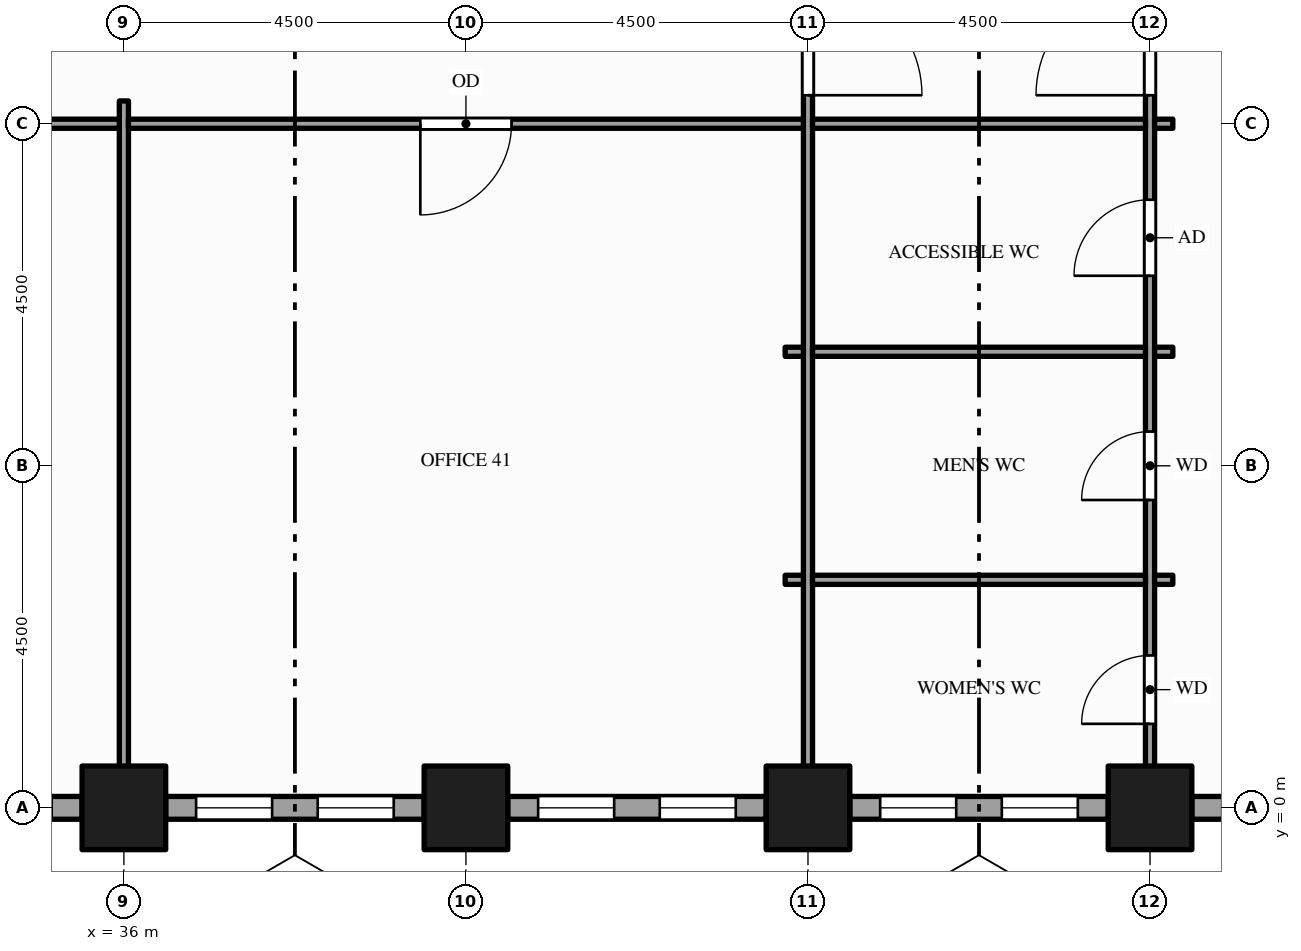
"""IFC4 building model, lengths in metres.
Left out: names, types, materials, properties, quantities, classifications, styles, units other than length and angle.
Written with IfcOpenShell. Run it as: python <this file> out.ifc"""

import sys

from ifc_helpers import new_model, si_unit, direction, frame, frame_2d, origin, origin_2d, place, context, subcontext, project, spatial, rectangle, hollow_rectangle, extrude, element, fill, save


model = new_model("IFC4")
c1 = context("Model", 3, precision=1e-05, world=origin(), true_north=direction((0.0, 1.0)))
c2 = subcontext(c1, "Body", "Model", "MODEL_VIEW")
j1 = project(units=[si_unit("LENGTHUNIT", "METRE"), si_unit("PLANEANGLEUNIT", "RADIAN")], contexts=[c1])
p1 = place(None, origin())
s1 = spatial("IfcSite", under=j1, at=p1, CompositionType="ELEMENT")
p2 = place(p1, origin())
s2 = spatial("IfcBuilding", under=s1, at=p2, CompositionType="ELEMENT")
p3 = place(p2, frame((0.0, 0.0, 14.0)))
s3 = spatial("IfcBuildingStorey", under=s2, at=p3, CompositionType="ELEMENT", Elevation=14.0)
for number, where, z_axis, x_axis in (
    (1, (36.0, 0.0, -0.25), (0.0, 0.0, 1.0), (1.0, 0.0, 0.0)),
    (2, (40.5, 0.0, -0.25), (0.0, 0.0, 1.0), (1.0, 0.0, 0.0)),
    (3, (45.0, 0.0, -0.25), (0.0, 0.0, 1.0), (1.0, 0.0, 0.0)),
    (4, (49.5, 0.0, -0.25), (0.0, 0.0, 1.0), (1.0, 0.0, 0.0)),
):
    element("IfcColumn", number, at=place(p3, frame(where, z_axis=z_axis, x_axis=x_axis)), inside=s3, PredefinedType="COLUMN", context=c2, shape_type="SweptSolid", body=[
        extrude(hollow_rectangle(XDim=1.1, YDim=1.1, WallThickness=0.06, at=origin_2d()), origin(), (0.0, 0.0, 1.0), 5.0),
    ])
p4 = place(p3, frame((32.05, 0.0, 0.0), z_axis=(0.0, 0.0, 1.0), x_axis=(1.0, 0.0, 0.0)))
e5 = element("IfcWall", 5, at=p4, inside=s3, PredefinedType="STANDARD", context=c2, shape_type="SweptSolid", body=[
    extrude(rectangle(XDim=3.4, YDim=0.3, at=frame_2d((1.7, 0.0))), origin(), (0.0, 0.0, 1.0), 4.036),
])
p5 = place(p4, frame((0.4, 0.0, 0.9)))
e6 = element("IfcOpeningElement", 6, at=p5, cuts=e5, PredefinedType="OPENING", context=c2, shape_type="SweptSolid", body=[
    extrude(rectangle(XDim=1.0, YDim=2.75, at=frame_2d((0.5, 1.375))), frame((0.0, 0.16, 0.0), z_axis=(0.0, -1.0, 0.0), x_axis=(1.0, 0.0, 0.0)), (0.0, 0.0, 1.0), 0.32),
])
p6 = place(p4, frame((2.0, 0.0, 0.9)))
e7 = element("IfcOpeningElement", 7, at=p6, cuts=e5, PredefinedType="OPENING", context=c2, shape_type="SweptSolid", body=[
    extrude(rectangle(XDim=1.0, YDim=2.75, at=frame_2d((0.5, 1.375))), frame((0.0, 0.16, 0.0), z_axis=(0.0, -1.0, 0.0), x_axis=(1.0, 0.0, 0.0)), (0.0, 0.0, 1.0), 0.32),
])
p7 = place(p3, frame((36.55, 0.0, 0.0), z_axis=(0.0, 0.0, 1.0), x_axis=(1.0, 0.0, 0.0)))
e8 = element("IfcWall", 8, at=p7, inside=s3, PredefinedType="STANDARD", context=c2, shape_type="SweptSolid", body=[
    extrude(rectangle(XDim=3.4, YDim=0.3, at=frame_2d((1.7, 0.0))), origin(), (0.0, 0.0, 1.0), 4.036),
])
p8 = place(p7, frame((0.4, 0.0, 0.9)))
e9 = element("IfcOpeningElement", 9, at=p8, cuts=e8, PredefinedType="OPENING", context=c2, shape_type="SweptSolid", body=[
    extrude(rectangle(XDim=1.0, YDim=2.75, at=frame_2d((0.5, 1.375))), frame((0.0, 0.16, 0.0), z_axis=(0.0, -1.0, 0.0), x_axis=(1.0, 0.0, 0.0)), (0.0, 0.0, 1.0), 0.32),
])
p9 = place(p7, frame((2.0, 0.0, 0.9)))
e10 = element("IfcOpeningElement", 10, at=p9, cuts=e8, PredefinedType="OPENING", context=c2, shape_type="SweptSolid", body=[
    extrude(rectangle(XDim=1.0, YDim=2.75, at=frame_2d((0.5, 1.375))), frame((0.0, 0.16, 0.0), z_axis=(0.0, -1.0, 0.0), x_axis=(1.0, 0.0, 0.0)), (0.0, 0.0, 1.0), 0.32),
])
p10 = place(p3, frame((41.05, 0.0, 0.0), z_axis=(0.0, 0.0, 1.0), x_axis=(1.0, 0.0, 0.0)))
e11 = element("IfcWall", 11, at=p10, inside=s3, PredefinedType="STANDARD", context=c2, shape_type="SweptSolid", body=[
    extrude(rectangle(XDim=3.4, YDim=0.3, at=frame_2d((1.7, 0.0))), origin(), (0.0, 0.0, 1.0), 4.036),
])
p11 = place(p10, frame((0.4, 0.0, 0.9)))
e12 = element("IfcOpeningElement", 12, at=p11, cuts=e11, PredefinedType="OPENING", context=c2, shape_type="SweptSolid", body=[
    extrude(rectangle(XDim=1.0, YDim=2.75, at=frame_2d((0.5, 1.375))), frame((0.0, 0.16, 0.0), z_axis=(0.0, -1.0, 0.0), x_axis=(1.0, 0.0, 0.0)), (0.0, 0.0, 1.0), 0.32),
])
p12 = place(p10, frame((2.0, 0.0, 0.9)))
e13 = element("IfcOpeningElement", 13, at=p12, cuts=e11, PredefinedType="OPENING", context=c2, shape_type="SweptSolid", body=[
    extrude(rectangle(XDim=1.0, YDim=2.75, at=frame_2d((0.5, 1.375))), frame((0.0, 0.16, 0.0), z_axis=(0.0, -1.0, 0.0), x_axis=(1.0, 0.0, 0.0)), (0.0, 0.0, 1.0), 0.32),
])
p13 = place(p3, frame((45.55, 0.0, 0.0), z_axis=(0.0, 0.0, 1.0), x_axis=(1.0, 0.0, 0.0)))
e14 = element("IfcWall", 14, at=p13, inside=s3, PredefinedType="STANDARD", context=c2, shape_type="SweptSolid", body=[
    extrude(rectangle(XDim=3.4, YDim=0.3, at=frame_2d((1.7, 0.0))), origin(), (0.0, 0.0, 1.0), 4.036),
])
p14 = place(p13, frame((0.4, 0.0, 0.9)))
e15 = element("IfcOpeningElement", 15, at=p14, cuts=e14, PredefinedType="OPENING", context=c2, shape_type="SweptSolid", body=[
    extrude(rectangle(XDim=1.0, YDim=2.75, at=frame_2d((0.5, 1.375))), frame((0.0, 0.16, 0.0), z_axis=(0.0, -1.0, 0.0), x_axis=(1.0, 0.0, 0.0)), (0.0, 0.0, 1.0), 0.32),
])
p15 = place(p13, frame((2.0, 0.0, 0.9)))
e16 = element("IfcOpeningElement", 16, at=p15, cuts=e14, PredefinedType="OPENING", context=c2, shape_type="SweptSolid", body=[
    extrude(rectangle(XDim=1.0, YDim=2.75, at=frame_2d((0.5, 1.375))), frame((0.0, 0.16, 0.0), z_axis=(0.0, -1.0, 0.0), x_axis=(1.0, 0.0, 0.0)), (0.0, 0.0, 1.0), 0.32),
])
p16 = place(p3, frame((50.05, 0.0, 0.0), z_axis=(0.0, 0.0, 1.0), x_axis=(1.0, 0.0, 0.0)))
e17 = element("IfcWall", 17, at=p16, inside=s3, PredefinedType="STANDARD", context=c2, shape_type="SweptSolid", body=[
    extrude(rectangle(XDim=3.949, YDim=0.3, at=frame_2d((1.975, 0.0))), origin(), (0.0, 0.0, 1.0), 4.036),
])
p17 = place(p16, frame((0.4, 0.0, 0.9)))
e18 = element("IfcOpeningElement", 18, at=p17, cuts=e17, PredefinedType="OPENING", context=c2, shape_type="SweptSolid", body=[
    extrude(rectangle(XDim=1.0, YDim=2.75, at=frame_2d((0.5, 1.375))), frame((0.0, 0.16, 0.0), z_axis=(0.0, -1.0, 0.0), x_axis=(1.0, 0.0, 0.0)), (0.0, 0.0, 1.0), 0.32),
])
p18 = place(p16, frame((2.024, 0.0, 0.9)))
e19 = element("IfcOpeningElement", 19, at=p18, cuts=e17, PredefinedType="OPENING", context=c2, shape_type="SweptSolid", body=[
    extrude(rectangle(XDim=1.5, YDim=2.75, at=frame_2d((0.75, 1.375))), frame((0.0, 0.16, 0.0), z_axis=(0.0, -1.0, 0.0), x_axis=(1.0, 0.0, 0.0)), (0.0, 0.0, 1.0), 0.32),
])
p19 = place(p3, frame((36.0, 0.15, 0.0), z_axis=(0.0, 0.0, 1.0), x_axis=(0.0, 1.0, 0.0)))
e20 = element("IfcWall", 20, at=p19, inside=s3, PredefinedType="PARTITIONING", context=c2, shape_type="SweptSolid", body=[
    extrude(rectangle(XDim=9.15, YDim=0.12, at=frame_2d((4.575, 0.0))), origin(), (0.0, 0.0, 1.0), 3.759),
])
p20 = place(p3, frame((45.0, 0.15, 0.0), z_axis=(0.0, 0.0, 1.0), x_axis=(0.0, 1.0, 0.0)))
e21 = element("IfcWall", 21, at=p20, inside=s3, PredefinedType="PARTITIONING", context=c2, shape_type="SweptSolid", body=[
    extrude(rectangle(XDim=22.65, YDim=0.12, at=frame_2d((11.325, 0.0))), origin(), (0.0, 0.0, 1.0), 3.759),
])
p21 = place(p20, frame((9.225, 0.0, 0.0)))
e22 = element("IfcOpeningElement", 22, at=p21, cuts=e21, PredefinedType="OPENING", context=c2, shape_type="SweptSolid", body=[
    extrude(rectangle(XDim=1.5, YDim=2.1, at=frame_2d((0.75, 1.05))), frame((0.0, 0.07, 0.0), z_axis=(0.0, -1.0, 0.0), x_axis=(1.0, 0.0, 0.0)), (0.0, 0.0, 1.0), 0.14),
])
p22 = place(p3, frame((49.5, 0.15, 0.0), z_axis=(0.0, 0.0, 1.0), x_axis=(0.0, 1.0, 0.0)))
e23 = element("IfcWall", 23, at=p22, inside=s3, PredefinedType="PARTITIONING", context=c2, shape_type="SweptSolid", body=[
    extrude(rectangle(XDim=22.65, YDim=0.12, at=frame_2d((11.325, 0.0))), origin(), (0.0, 0.0, 1.0), 3.759),
])
p23 = place(p22, frame((0.955, 0.0, 0.0)))
e24 = element("IfcOpeningElement", 24, at=p23, cuts=e23, PredefinedType="OPENING", context=c2, shape_type="SweptSolid", body=[
    extrude(rectangle(XDim=0.9, YDim=2.1, at=frame_2d((0.45, 1.05))), frame((0.0, 0.07, 0.0), z_axis=(0.0, -1.0, 0.0), x_axis=(1.0, 0.0, 0.0)), (0.0, 0.0, 1.0), 0.14),
])
p24 = place(p22, frame((3.9, 0.0, 0.0)))
e25 = element("IfcOpeningElement", 25, at=p24, cuts=e23, PredefinedType="OPENING", context=c2, shape_type="SweptSolid", body=[
    extrude(rectangle(XDim=0.9, YDim=2.1, at=frame_2d((0.45, 1.05))), frame((0.0, 0.07, 0.0), z_axis=(0.0, -1.0, 0.0), x_axis=(1.0, 0.0, 0.0)), (0.0, 0.0, 1.0), 0.14),
])
p25 = place(p22, frame((6.85, 0.0, 0.0)))
e26 = element("IfcOpeningElement", 26, at=p25, cuts=e23, PredefinedType="OPENING", context=c2, shape_type="SweptSolid", body=[
    extrude(rectangle(XDim=1.0, YDim=2.1, at=frame_2d((0.5, 1.05))), frame((0.0, 0.07, 0.0), z_axis=(0.0, -1.0, 0.0), x_axis=(1.0, 0.0, 0.0)), (0.0, 0.0, 1.0), 0.14),
])
p26 = place(p22, frame((16.275, 0.0, 0.0)))
e27 = element("IfcOpeningElement", 27, at=p26, cuts=e23, PredefinedType="OPENING", context=c2, shape_type="SweptSolid", body=[
    extrude(rectangle(XDim=0.9, YDim=2.1, at=frame_2d((0.45, 1.05))), frame((0.0, 0.07, 0.0), z_axis=(0.0, -1.0, 0.0), x_axis=(1.0, 0.0, 0.0)), (0.0, 0.0, 1.0), 0.14),
])
p27 = place(p22, frame((9.225, 0.0, 0.0)))
e28 = element("IfcOpeningElement", 28, at=p27, cuts=e23, PredefinedType="OPENING", context=c2, shape_type="SweptSolid", body=[
    extrude(rectangle(XDim=1.5, YDim=2.1, at=frame_2d((0.75, 1.05))), frame((0.0, 0.07, 0.0), z_axis=(0.0, -1.0, 0.0), x_axis=(1.0, 0.0, 0.0)), (0.0, 0.0, 1.0), 0.14),
])
p28 = place(p3, frame((44.7, 3.0, 0.0), z_axis=(0.0, 0.0, 1.0), x_axis=(1.0, 0.0, 0.0)))
e29 = element("IfcWall", 29, at=p28, inside=s3, PredefinedType="PARTITIONING", context=c2, shape_type="SweptSolid", body=[
    extrude(rectangle(XDim=0.24, YDim=0.12, at=frame_2d((0.12, 0.0))), origin(), (0.0, 0.0, 1.0), 3.759),
])
p29 = place(p3, frame((45.06, 3.0, 0.0), z_axis=(0.0, 0.0, 1.0), x_axis=(1.0, 0.0, 0.0)))
e30 = element("IfcWall", 30, at=p29, inside=s3, PredefinedType="PARTITIONING", context=c2, shape_type="SweptSolid", body=[
    extrude(rectangle(XDim=4.38, YDim=0.12, at=frame_2d((2.19, 0.0))), origin(), (0.0, 0.0, 1.0), 3.66),
])
for number, where, z_axis, x_axis in (
    (31, (49.56, 3.0, 0.0), (0.0, 0.0, 1.0), (1.0, 0.0, 0.0)),
    (32, (44.7, 6.0, 0.0), (0.0, 0.0, 1.0), (1.0, 0.0, 0.0)),
):
    element("IfcWall", number, at=place(p3, frame(where, z_axis=z_axis, x_axis=x_axis)), inside=s3, PredefinedType="PARTITIONING", context=c2, shape_type="SweptSolid", body=[
        extrude(rectangle(XDim=0.24, YDim=0.12, at=frame_2d((0.12, 0.0))), origin(), (0.0, 0.0, 1.0), 3.759),
    ])
p30 = place(p3, frame((45.06, 6.0, 0.0), z_axis=(0.0, 0.0, 1.0), x_axis=(1.0, 0.0, 0.0)))
e33 = element("IfcWall", 33, at=p30, inside=s3, PredefinedType="PARTITIONING", context=c2, shape_type="SweptSolid", body=[
    extrude(rectangle(XDim=4.38, YDim=0.12, at=frame_2d((2.19, 0.0))), origin(), (0.0, 0.0, 1.0), 3.66),
])
p31 = place(p3, frame((49.56, 6.0, 0.0), z_axis=(0.0, 0.0, 1.0), x_axis=(1.0, 0.0, 0.0)))
e34 = element("IfcWall", 34, at=p31, inside=s3, PredefinedType="PARTITIONING", context=c2, shape_type="SweptSolid", body=[
    extrude(rectangle(XDim=0.24, YDim=0.12, at=frame_2d((0.12, 0.0))), origin(), (0.0, 0.0, 1.0), 3.759),
])
p32 = place(p3, frame((27.06, 9.0, 0.0), z_axis=(0.0, 0.0, 1.0), x_axis=(1.0, 0.0, 0.0)))
e35 = element("IfcWall", 35, at=p32, inside=s3, PredefinedType="PARTITIONING", context=c2, shape_type="SweptSolid", body=[
    extrude(rectangle(XDim=8.88, YDim=0.12, at=frame_2d((4.44, 0.0))), origin(), (0.0, 0.0, 1.0), 3.66),
])
p33 = place(p32, frame((3.84, 0.0, 0.0)))
e36 = element("IfcOpeningElement", 36, at=p33, cuts=e35, PredefinedType="OPENING", context=c2, shape_type="SweptSolid", body=[
    extrude(rectangle(XDim=1.2, YDim=2.1, at=frame_2d((0.6, 1.05))), frame((0.0, 0.07, 0.0), z_axis=(0.0, -1.0, 0.0), x_axis=(1.0, 0.0, 0.0)), (0.0, 0.0, 1.0), 0.14),
])
p34 = place(p3, frame((36.06, 9.0, 0.0), z_axis=(0.0, 0.0, 1.0), x_axis=(1.0, 0.0, 0.0)))
e37 = element("IfcWall", 37, at=p34, inside=s3, PredefinedType="PARTITIONING", context=c2, shape_type="SweptSolid", body=[
    extrude(rectangle(XDim=8.88, YDim=0.12, at=frame_2d((4.44, 0.0))), origin(), (0.0, 0.0, 1.0), 3.66),
])
p35 = place(p34, frame((3.84, 0.0, 0.0)))
e38 = element("IfcOpeningElement", 38, at=p35, cuts=e37, PredefinedType="OPENING", context=c2, shape_type="SweptSolid", body=[
    extrude(rectangle(XDim=1.2, YDim=2.1, at=frame_2d((0.6, 1.05))), frame((0.0, 0.07, 0.0), z_axis=(0.0, -1.0, 0.0), x_axis=(1.0, 0.0, 0.0)), (0.0, 0.0, 1.0), 0.14),
])
p36 = place(p3, frame((45.06, 9.0, 0.0), z_axis=(0.0, 0.0, 1.0), x_axis=(1.0, 0.0, 0.0)))
e39 = element("IfcWall", 39, at=p36, inside=s3, PredefinedType="PARTITIONING", context=c2, shape_type="SweptSolid", body=[
    extrude(rectangle(XDim=4.38, YDim=0.12, at=frame_2d((2.19, 0.0))), origin(), (0.0, 0.0, 1.0), 3.66),
])
p37 = place(p3, frame((49.56, 9.0, 0.0), z_axis=(0.0, 0.0, 1.0), x_axis=(1.0, 0.0, 0.0)))
e40 = element("IfcWall", 40, at=p37, inside=s3, PredefinedType="PARTITIONING", context=c2, shape_type="SweptSolid", body=[
    extrude(rectangle(XDim=0.24, YDim=0.12, at=frame_2d((0.12, 0.0))), origin(), (0.0, 0.0, 1.0), 3.759),
])
p38 = place(p8, origin())
e41 = element("IfcWindow", 41, at=p38, inside=s3, PartitioningType="SINGLE_PANEL", PredefinedType="WINDOW", context=c2, shape_type="SweptSolid", body=[
    extrude(rectangle(XDim=1.0, YDim=2.75, at=frame_2d((0.5, 1.375))), frame((0.0, 0.03, 0.0), z_axis=(0.0, -1.0, 0.0), x_axis=(1.0, 0.0, 0.0)), (0.0, 0.0, 1.0), 0.06),
])
fill(e9, e41)
p39 = place(p9, origin())
e42 = element("IfcWindow", 42, at=p39, inside=s3, PartitioningType="SINGLE_PANEL", PredefinedType="WINDOW", context=c2, shape_type="SweptSolid", body=[
    extrude(rectangle(XDim=1.0, YDim=2.75, at=frame_2d((0.5, 1.375))), frame((0.0, 0.03, 0.0), z_axis=(0.0, -1.0, 0.0), x_axis=(1.0, 0.0, 0.0)), (0.0, 0.0, 1.0), 0.06),
])
fill(e10, e42)
p40 = place(p11, origin())
e43 = element("IfcWindow", 43, at=p40, inside=s3, PartitioningType="SINGLE_PANEL", PredefinedType="WINDOW", context=c2, shape_type="SweptSolid", body=[
    extrude(rectangle(XDim=1.0, YDim=2.75, at=frame_2d((0.5, 1.375))), frame((0.0, 0.03, 0.0), z_axis=(0.0, -1.0, 0.0), x_axis=(1.0, 0.0, 0.0)), (0.0, 0.0, 1.0), 0.06),
])
fill(e12, e43)
p41 = place(p12, origin())
e44 = element("IfcWindow", 44, at=p41, inside=s3, PartitioningType="SINGLE_PANEL", PredefinedType="WINDOW", context=c2, shape_type="SweptSolid", body=[
    extrude(rectangle(XDim=1.0, YDim=2.75, at=frame_2d((0.5, 1.375))), frame((0.0, 0.03, 0.0), z_axis=(0.0, -1.0, 0.0), x_axis=(1.0, 0.0, 0.0)), (0.0, 0.0, 1.0), 0.06),
])
fill(e13, e44)
p42 = place(p14, origin())
e45 = element("IfcWindow", 45, at=p42, inside=s3, PartitioningType="SINGLE_PANEL", PredefinedType="WINDOW", context=c2, shape_type="SweptSolid", body=[
    extrude(rectangle(XDim=1.0, YDim=2.75, at=frame_2d((0.5, 1.375))), frame((0.0, 0.03, 0.0), z_axis=(0.0, -1.0, 0.0), x_axis=(1.0, 0.0, 0.0)), (0.0, 0.0, 1.0), 0.06),
])
fill(e15, e45)
p43 = place(p15, origin())
e46 = element("IfcWindow", 46, at=p43, inside=s3, PartitioningType="SINGLE_PANEL", PredefinedType="WINDOW", context=c2, shape_type="SweptSolid", body=[
    extrude(rectangle(XDim=1.0, YDim=2.75, at=frame_2d((0.5, 1.375))), frame((0.0, 0.03, 0.0), z_axis=(0.0, -1.0, 0.0), x_axis=(1.0, 0.0, 0.0)), (0.0, 0.0, 1.0), 0.06),
])
fill(e16, e46)
p44 = place(p23, origin())
e47 = element("IfcDoor", 47, at=p44, inside=s3, OperationType="SINGLE_SWING_LEFT", PredefinedType="DOOR", context=c2, shape_type="SweptSolid", body=[
    extrude(rectangle(XDim=0.9, YDim=2.1, at=frame_2d((0.45, 1.05))), frame((0.0, 0.025, 0.0), z_axis=(0.0, -1.0, 0.0), x_axis=(1.0, 0.0, 0.0)), (0.0, 0.0, 1.0), 0.05),
])
fill(e24, e47)
p45 = place(p24, origin())
e48 = element("IfcDoor", 48, at=p45, inside=s3, OperationType="SINGLE_SWING_LEFT", PredefinedType="DOOR", context=c2, shape_type="SweptSolid", body=[
    extrude(rectangle(XDim=0.9, YDim=2.1, at=frame_2d((0.45, 1.05))), frame((0.0, 0.025, 0.0), z_axis=(0.0, -1.0, 0.0), x_axis=(1.0, 0.0, 0.0)), (0.0, 0.0, 1.0), 0.05),
])
fill(e25, e48)
p46 = place(p25, origin())
e49 = element("IfcDoor", 49, at=p46, inside=s3, OperationType="SINGLE_SWING_LEFT", PredefinedType="DOOR", context=c2, shape_type="SweptSolid", body=[
    extrude(rectangle(XDim=1.0, YDim=2.1, at=frame_2d((0.5, 1.05))), frame((0.0, 0.025, 0.0), z_axis=(0.0, -1.0, 0.0), x_axis=(1.0, 0.0, 0.0)), (0.0, 0.0, 1.0), 0.05),
])
fill(e26, e49)
p47 = place(p27, origin())
e50 = element("IfcDoor", 50, at=p47, inside=s3, OperationType="SINGLE_SWING_LEFT", PredefinedType="DOOR", context=c2, shape_type="SweptSolid", body=[
    extrude(rectangle(XDim=1.5, YDim=2.1, at=frame_2d((0.75, 1.05))), frame((0.0, 0.025, 0.0), z_axis=(0.0, -1.0, 0.0), x_axis=(1.0, 0.0, 0.0)), (0.0, 0.0, 1.0), 0.05),
])
fill(e28, e50)
p48 = place(p21, origin())
e51 = element("IfcDoor", 51, at=p48, inside=s3, OperationType="SINGLE_SWING_LEFT", PredefinedType="DOOR", context=c2, shape_type="SweptSolid", body=[
    extrude(rectangle(XDim=1.5, YDim=2.1, at=frame_2d((0.75, 1.05))), frame((0.0, 0.025, 0.0), z_axis=(0.0, -1.0, 0.0), x_axis=(1.0, 0.0, 0.0)), (0.0, 0.0, 1.0), 0.05),
])
fill(e22, e51)
p49 = place(p35, origin())
e52 = element("IfcDoor", 52, at=p49, inside=s3, OperationType="SINGLE_SWING_LEFT", PredefinedType="DOOR", context=c2, shape_type="SweptSolid", body=[
    extrude(rectangle(XDim=1.2, YDim=2.1, at=frame_2d((0.6, 1.05))), frame((0.0, 0.025, 0.0), z_axis=(0.0, -1.0, 0.0), x_axis=(1.0, 0.0, 0.0)), (0.0, 0.0, 1.0), 0.05),
])
fill(e38, e52)
save(model, sys.argv[1])
